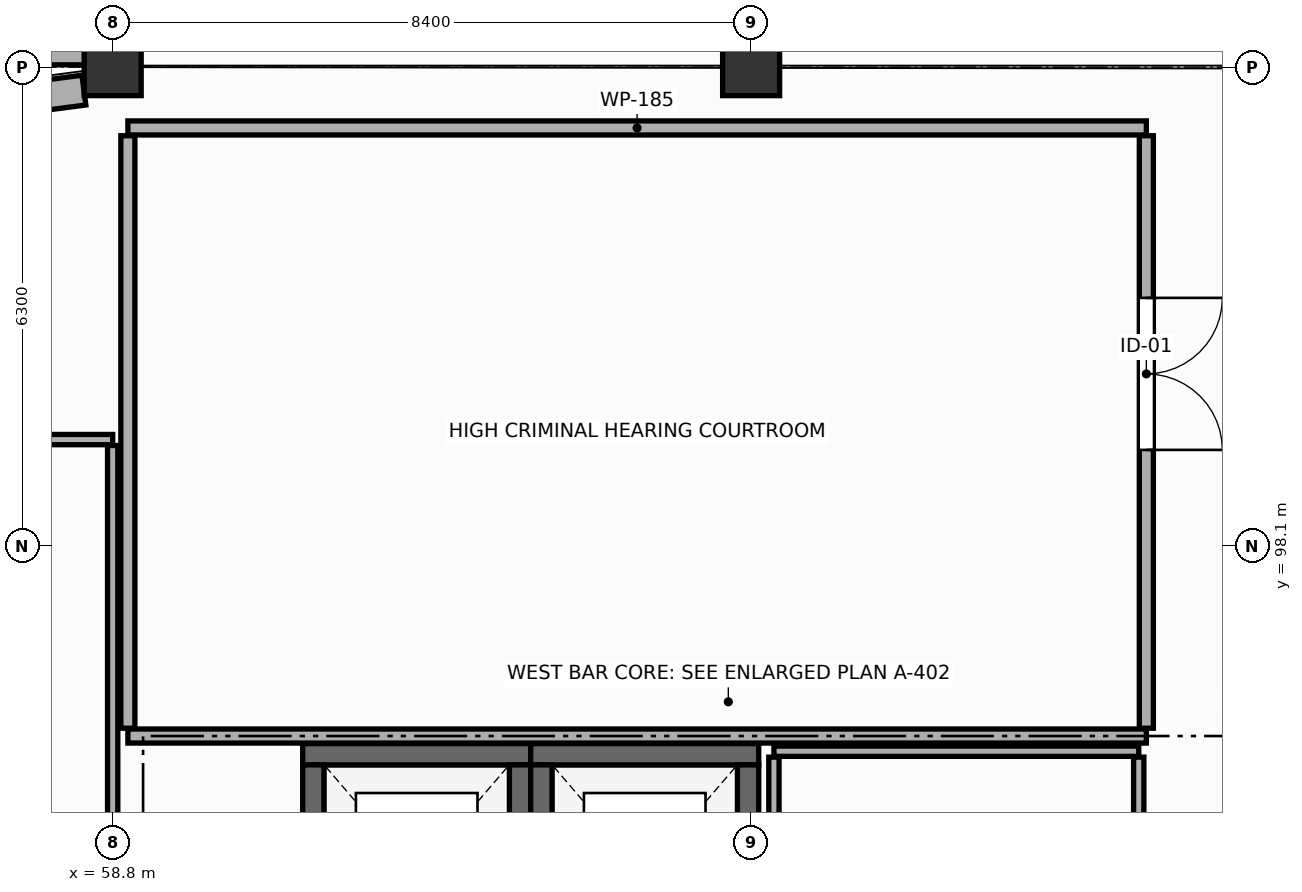
"""IFC4 building model, lengths in metres.
Left out: names, types, materials, properties, quantities, classifications, styles, units other than length and angle.
Written with IfcOpenShell. Run it as: python <this file> out.ifc"""

import sys

from ifc_helpers import new_model, si_unit, direction, frame, frame_2d, origin, origin_2d, place, context, subcontext, project, spatial, rectangle, extrude, element, fill, save


model = new_model("IFC4")
c1 = context("Model", 3, precision=1e-05, world=origin(), true_north=direction((0.0, 1.0)))
c2 = subcontext(c1, "Body", "Model", "MODEL_VIEW")
j1 = project(units=[si_unit("LENGTHUNIT", "METRE"), si_unit("PLANEANGLEUNIT", "RADIAN")], contexts=[c1])
p1 = place(None, origin())
s1 = spatial("IfcSite", under=j1, at=p1, CompositionType="ELEMENT")
p2 = place(p1, origin())
s2 = spatial("IfcBuilding", under=s1, at=p2, CompositionType="ELEMENT")
p3 = place(p2, frame((0.0, 0.0, 9.9)))
s3 = spatial("IfcBuildingStorey", under=s2, at=p3, CompositionType="ELEMENT", Elevation=9.9)
for number, where, z_axis, x_axis in (
    (1, (58.8, 104.4, 0.0), (0.0, 0.0, 1.0), (1.0, 0.0, 0.0)),
    (2, (67.2, 104.4, 0.0), (0.0, 0.0, 1.0), (1.0, 0.0, 0.0)),
):
    element("IfcColumn", number, at=place(p3, frame(where, z_axis=z_axis, x_axis=x_axis)), inside=s3, PredefinedType="COLUMN", context=c2, shape_type="SweptSolid", body=[
        extrude(rectangle(XDim=0.75, YDim=0.75, at=origin_2d()), origin(), (0.0, 0.0, 1.0), 4.5),
    ])
p4 = place(p3, frame((58.433, 104.65, 0.0), z_axis=(0.0, 0.0, 1.0), x_axis=(-1.0, 0.0, 0.0)))
e3 = element("IfcWall", 3, at=p4, inside=s3, PredefinedType="STANDARD", context=c2, shape_type="SweptSolid", body=[
    extrude(rectangle(XDim=11.733, YDim=0.44, at=frame_2d((5.867, 0.0))), origin(), (0.0, 0.0, 1.0), 3.33),
])
p5 = place(p4, frame((2.708, 0.0, 0.9)))
e4 = element("IfcOpeningElement", 4, at=p5, cuts=e3, PredefinedType="OPENING", context=c2, shape_type="SweptSolid", body=[
    extrude(rectangle(XDim=1.2, YDim=1.85, at=frame_2d((0.6, 0.925))), frame((0.0, 0.23, 0.0), z_axis=(0.0, -1.0, 0.0), x_axis=(1.0, 0.0, 0.0)), (0.0, 0.0, 1.0), 0.46),
])
p6 = place(p4, frame((7.958, 0.0, 0.9)))
e5 = element("IfcOpeningElement", 5, at=p6, cuts=e3, PredefinedType="OPENING", context=c2, shape_type="SweptSolid", body=[
    extrude(rectangle(XDim=1.2, YDim=1.85, at=frame_2d((0.6, 0.925))), frame((0.0, 0.23, 0.0), z_axis=(0.0, -1.0, 0.0), x_axis=(1.0, 0.0, 0.0)), (0.0, 0.0, 1.0), 0.46),
])
p7 = place(p3, frame((58.421, 104.098, 0.0), z_axis=(0.0, 0.0, 1.0), x_axis=(-0.991451982445, -0.130472090904, 0.0)))
e6 = element("IfcWall", 6, at=p7, inside=s3, PredefinedType="ELEMENTEDWALL", context=c2, shape_type="SweptSolid", body=[
    extrude(rectangle(XDim=2.874, YDim=0.395, at=frame_2d((1.437, 0.0))), origin(), (0.0, 0.0, 1.0), 3.38),
])
p8 = place(p7, frame((0.987, 0.0, 0.85)))
e7 = element("IfcOpeningElement", 7, at=p8, cuts=e6, PredefinedType="OPENING", context=c2, shape_type="SweptSolid", body=[
    extrude(rectangle(XDim=0.9, YDim=1.85, at=frame_2d((0.45, 0.925))), frame((0.0, 0.208, 0.0), z_axis=(0.0, -1.0, 0.0), x_axis=(1.0, 0.0, 0.0)), (0.0, 0.0, 1.0), 0.415),
])
p9 = place(p3, frame((61.3, 95.36, 0.0), z_axis=(0.0, 0.0, 1.0), x_axis=(1.0, 0.0, 0.0)))
e8 = element("IfcWall", 8, at=p9, inside=s3, PredefinedType="SHEAR", context=c2, shape_type="SweptSolid", body=[
    extrude(rectangle(XDim=3.0, YDim=0.28, at=frame_2d((1.5, 0.0))), origin(), (0.0, 0.0, 1.0), 4.25),
])
for number, where, z_axis, x_axis in (
    (9, (61.44, 92.38, 0.0), (0.0, 0.0, 1.0), (0.0, 1.0, 0.0)),
    (10, (64.16, 95.22, 0.0), (0.0, 0.0, 1.0), (0.0, -1.0, 0.0)),
):
    element("IfcWall", number, at=place(p3, frame(where, z_axis=z_axis, x_axis=x_axis)), inside=s3, PredefinedType="SHEAR", context=c2, shape_type="SweptSolid", body=[
        extrude(rectangle(XDim=2.84, YDim=0.28, at=frame_2d((1.42, 0.0))), origin(), (0.0, 0.0, 1.0), 4.25),
    ])
p10 = place(p3, frame((64.3, 95.36, 0.0), z_axis=(0.0, 0.0, 1.0), x_axis=(1.0, 0.0, 0.0)))
e11 = element("IfcWall", 11, at=p10, inside=s3, PredefinedType="SHEAR", context=c2, shape_type="SweptSolid", body=[
    extrude(rectangle(XDim=3.0, YDim=0.28, at=frame_2d((1.5, 0.0))), origin(), (0.0, 0.0, 1.0), 4.25),
])
for number, where, z_axis, x_axis in (
    (12, (64.44, 92.38, 0.0), (0.0, 0.0, 1.0), (0.0, 1.0, 0.0)),
    (13, (67.16, 95.22, 0.0), (0.0, 0.0, 1.0), (0.0, -1.0, 0.0)),
):
    element("IfcWall", number, at=place(p3, frame(where, z_axis=z_axis, x_axis=x_axis)), inside=s3, PredefinedType="SHEAR", context=c2, shape_type="SweptSolid", body=[
        extrude(rectangle(XDim=2.84, YDim=0.28, at=frame_2d((1.42, 0.0))), origin(), (0.0, 0.0, 1.0), 4.25),
    ])
for number, where, z_axis, x_axis in (
    (14, (59.0, 103.6, 0.0), (0.0, 0.0, 1.0), (1.0, 0.0, 0.0)),
    (15, (72.4, 95.6, 0.0), (0.0, 0.0, 1.0), (-1.0, 0.0, 0.0)),
):
    element("IfcWall", number, at=place(p3, frame(where, z_axis=z_axis, x_axis=x_axis)), inside=s3, PredefinedType="PARTITIONING", context=c2, shape_type="SweptSolid", body=[
        extrude(rectangle(XDim=13.4, YDim=0.185, at=frame_2d((6.7, 0.0))), origin(), (0.0, 0.0, 1.0), 3.38),
    ])
p11 = place(p3, frame((59.0, 95.702, 0.0), z_axis=(0.0, 0.0, 1.0), x_axis=(0.0, 1.0, 0.0)))
e16 = element("IfcWall", 16, at=p11, inside=s3, PredefinedType="PARTITIONING", context=c2, shape_type="SweptSolid", body=[
    extrude(rectangle(XDim=7.795, YDim=0.185, at=frame_2d((3.897, 0.0))), origin(), (0.0, 0.0, 1.0), 3.38),
])
p12 = place(p3, frame((72.4, 103.498, 0.0), z_axis=(0.0, 0.0, 1.0), x_axis=(0.0, -1.0, 0.0)))
e17 = element("IfcWall", 17, at=p12, inside=s3, PredefinedType="PARTITIONING", context=c2, shape_type="SweptSolid", body=[
    extrude(rectangle(XDim=7.795, YDim=0.185, at=frame_2d((3.897, 0.0))), origin(), (0.0, 0.0, 1.0), 3.63),
])
p13 = place(p12, frame((2.133, 0.0, 0.0)))
e18 = element("IfcOpeningElement", 18, at=p13, cuts=e17, PredefinedType="OPENING", context=c2, shape_type="SweptSolid", body=[
    extrude(rectangle(XDim=2.0, YDim=2.5, at=frame_2d((1.0, 1.25))), frame((0.0, 0.103, 0.0), z_axis=(0.0, -1.0, 0.0), x_axis=(1.0, 0.0, 0.0)), (0.0, 0.0, 1.0), 0.205),
])
p14 = place(p3, frame((67.5, 95.4, 0.0), z_axis=(0.0, 0.0, 1.0), x_axis=(1.0, 0.0, 0.0)))
e19 = element("IfcWall", 19, at=p14, inside=s3, PredefinedType="PARTITIONING", context=c2, shape_type="SweptSolid", body=[
    extrude(rectangle(XDim=4.8, YDim=0.135, at=frame_2d((2.4, 0.0))), origin(), (0.0, 0.0, 1.0), 3.38),
])
p15 = place(p3, frame((67.5, 92.028, 0.0), z_axis=(0.0, 0.0, 1.0), x_axis=(0.0, 1.0, 0.0)))
e20 = element("IfcWall", 20, at=p15, inside=s3, PredefinedType="PARTITIONING", context=c2, shape_type="SweptSolid", body=[
    extrude(rectangle(XDim=3.295, YDim=0.135, at=frame_2d((1.647, 0.0))), origin(), (0.0, 0.0, 1.0), 3.38),
])
p16 = place(p3, frame((72.3, 95.323, 0.0), z_axis=(0.0, 0.0, 1.0), x_axis=(0.0, -1.0, 0.0)))
e21 = element("IfcWall", 21, at=p16, inside=s3, PredefinedType="PARTITIONING", context=c2, shape_type="SweptSolid", body=[
    extrude(rectangle(XDim=3.295, YDim=0.135, at=frame_2d((1.647, 0.0))), origin(), (0.0, 0.0, 1.0), 3.68),
])
p17 = place(p3, frame((49.3, 99.5, 0.0), z_axis=(0.0, 0.0, 1.0), x_axis=(1.0, 0.0, 0.0)))
e22 = element("IfcWall", 22, at=p17, inside=s3, PredefinedType="PARTITIONING", context=c2, shape_type="SweptSolid", body=[
    extrude(rectangle(XDim=9.5, YDim=0.135, at=frame_2d((4.75, 0.0))), origin(), (0.0, 0.0, 1.0), 3.28),
])
p18 = place(p3, frame((58.8, 99.423, 0.0), z_axis=(0.0, 0.0, 1.0), x_axis=(0.0, -1.0, 0.0)))
e23 = element("IfcWall", 23, at=p18, inside=s3, PredefinedType="PARTITIONING", context=c2, shape_type="SweptSolid", body=[
    extrude(rectangle(XDim=7.395, YDim=0.135, at=frame_2d((3.698, 0.0))), origin(), (0.0, 0.0, 1.0), 3.38),
])
p19 = place(p13, origin())
e24 = element("IfcDoor", 24, at=p19, inside=s3, OperationType="DOUBLE_DOOR_SINGLE_SWING", PredefinedType="DOOR", context=c2, shape_type="SweptSolid", body=[
    extrude(rectangle(XDim=2.0, YDim=2.5, at=frame_2d((1.0, 1.25))), frame((0.0, 0.025, 0.0), z_axis=(0.0, -1.0, 0.0), x_axis=(1.0, 0.0, 0.0)), (0.0, 0.0, 1.0), 0.05),
])
fill(e18, e24)
save(model, sys.argv[1])
